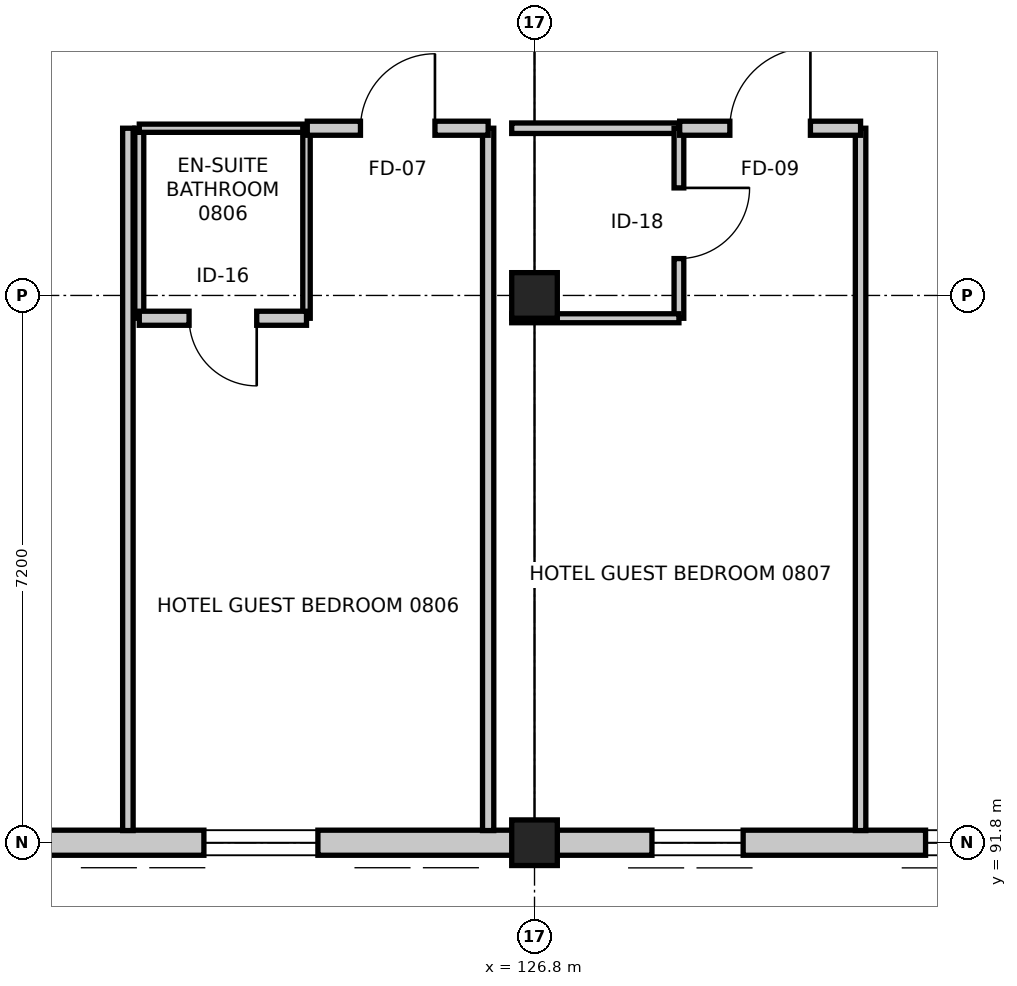
"""IFC4 building model, lengths in metres.
Left out: names, types, materials, properties, quantities, classifications, styles, units other than length and angle.
Written with IfcOpenShell. Run it as: python <this file> out.ifc"""

import sys

from ifc_helpers import new_model, si_unit, direction, frame, frame_2d, origin, origin_2d, place, context, subcontext, project, spatial, rectangle, extrude, element, fill, save


model = new_model("IFC4")
c1 = context("Model", 3, precision=1e-05, world=origin(), true_north=direction((0.0, 1.0)))
c2 = subcontext(c1, "Body", "Model", "MODEL_VIEW")
j1 = project(units=[si_unit("LENGTHUNIT", "METRE"), si_unit("PLANEANGLEUNIT", "RADIAN")], contexts=[c1])
p1 = place(None, origin())
s1 = spatial("IfcSite", under=j1, at=p1, CompositionType="ELEMENT")
p2 = place(p1, origin())
s2 = spatial("IfcBuilding", under=s1, at=p2, CompositionType="ELEMENT")
p3 = place(p2, frame((0.0, 0.0, 33.6)))
s3 = spatial("IfcBuildingStorey", under=s2, at=p3, CompositionType="ELEMENT", Elevation=33.6)
for number, where, z_axis, x_axis in (
    (1, (126.8, 91.8, 0.0), (0.0, 0.0, 1.0), (1.0, 0.0, 0.0)),
    (2, (126.8, 99.0, 0.0), (0.0, 0.0, 1.0), (1.0, 0.0, 0.0)),
):
    element("IfcColumn", number, at=place(p3, frame(where, z_axis=z_axis, x_axis=x_axis)), inside=s3, PredefinedType="COLUMN", context=c2, shape_type="SweptSolid", body=[
        extrude(rectangle(XDim=0.6, YDim=0.6, at=origin_2d()), origin(), (0.0, 0.0, 1.0), 3.6),
    ])
p4 = place(p3, frame((134.0, 91.8, 0.0), z_axis=(0.0, 0.0, 1.0), x_axis=(-1.0, 0.0, 0.0)))
e3 = element("IfcWall", 3, at=p4, inside=s3, PredefinedType="STANDARD", context=c2, shape_type="SweptSolid", body=[
    extrude(rectangle(XDim=7.2, YDim=0.33, at=frame_2d((3.6, 0.0))), origin(), (0.0, 0.0, 1.0), 2.745),
])
p5 = place(p4, frame((0.855, 0.0, 0.75)))
e4 = element("IfcOpeningElement", 4, at=p5, cuts=e3, PredefinedType="OPENING", context=c2, shape_type="SweptSolid", body=[
    extrude(rectangle(XDim=1.2, YDim=1.5, at=frame_2d((0.6, 0.75))), frame((0.0, 0.175, 0.0), z_axis=(0.0, -1.0, 0.0), x_axis=(1.0, 0.0, 0.0)), (0.0, 0.0, 1.0), 0.35),
])
p6 = place(p4, frame((4.455, 0.0, 0.75)))
e5 = element("IfcOpeningElement", 5, at=p6, cuts=e3, PredefinedType="OPENING", context=c2, shape_type="SweptSolid", body=[
    extrude(rectangle(XDim=1.2, YDim=1.5, at=frame_2d((0.6, 0.75))), frame((0.0, 0.175, 0.0), z_axis=(0.0, -1.0, 0.0), x_axis=(1.0, 0.0, 0.0)), (0.0, 0.0, 1.0), 0.35),
])
p7 = place(p3, frame((126.8, 91.8, 0.0), z_axis=(0.0, 0.0, 1.0), x_axis=(-1.0, 0.0, 0.0)))
e6 = element("IfcWall", 6, at=p7, inside=s3, PredefinedType="STANDARD", context=c2, shape_type="SweptSolid", body=[
    extrude(rectangle(XDim=7.2, YDim=0.33, at=frame_2d((3.6, 0.0))), origin(), (0.0, 0.0, 1.0), 2.745),
])
p8 = place(p7, frame((2.85, 0.0, 0.75)))
e7 = element("IfcOpeningElement", 7, at=p8, cuts=e6, PredefinedType="OPENING", context=c2, shape_type="SweptSolid", body=[
    extrude(rectangle(XDim=1.5, YDim=1.5, at=frame_2d((0.75, 0.75))), frame((0.0, 0.175, 0.0), z_axis=(0.0, -1.0, 0.0), x_axis=(1.0, 0.0, 0.0)), (0.0, 0.0, 1.0), 0.35),
])
p9 = place(p3, frame((121.6, 98.7, 0.0), z_axis=(0.0, 0.0, 1.0), x_axis=(0.0, 1.0, 0.0)))
e8 = element("IfcWall", 8, at=p9, inside=s3, PredefinedType="PARTITIONING", context=c2, shape_type="SweptSolid", body=[
    extrude(rectangle(XDim=2.5, YDim=0.118, at=frame_2d((1.25, 0.0))), origin(), (0.0, 0.0, 1.0), 2.745),
])
p10 = place(p3, frame((121.6, 101.2, 0.0), z_axis=(0.0, 0.0, 1.0), x_axis=(1.0, 0.0, 0.0)))
e9 = element("IfcWall", 9, at=p10, inside=s3, PredefinedType="PARTITIONING", context=c2, shape_type="SweptSolid", body=[
    extrude(rectangle(XDim=2.2, YDim=0.108, at=frame_2d((1.1, 0.0))), origin(), (0.0, 0.0, 1.0), 3.36),
])
p11 = place(p3, frame((123.8, 101.2, 0.0), z_axis=(0.0, 0.0, 1.0), x_axis=(0.0, -1.0, 0.0)))
e10 = element("IfcWall", 10, at=p11, inside=s3, PredefinedType="PARTITIONING", context=c2, shape_type="SweptSolid", body=[
    extrude(rectangle(XDim=2.5, YDim=0.098, at=frame_2d((1.25, 0.0))), origin(), (0.0, 0.0, 1.0), 2.745),
])
p12 = place(p3, frame((123.8, 98.7, 0.0), z_axis=(0.0, 0.0, 1.0), x_axis=(-1.0, 0.0, 0.0)))
e11 = element("IfcWall", 11, at=p12, inside=s3, PredefinedType="PARTITIONING", context=c2, shape_type="SweptSolid", body=[
    extrude(rectangle(XDim=2.2, YDim=0.185, at=frame_2d((1.1, 0.0))), origin(), (0.0, 0.0, 1.0), 2.745),
])
p13 = place(p12, frame((0.655, 0.0, 0.0)))
e12 = element("IfcOpeningElement", 12, at=p13, cuts=e11, PredefinedType="OPENING", context=c2, shape_type="SweptSolid", body=[
    extrude(rectangle(XDim=0.89, YDim=2.09, at=frame_2d((0.445, 1.045))), frame((0.0, 0.103, 0.0), z_axis=(0.0, -1.0, 0.0), x_axis=(1.0, 0.0, 0.0)), (0.0, 0.0, 1.0), 0.205),
])
p14 = place(p3, frame((126.19, 101.2, 0.0), z_axis=(0.0, 0.0, 1.0), x_axis=(0.0, -1.0, 0.0)))
e13 = element("IfcWall", 13, at=p14, inside=s3, PredefinedType="PARTITIONING", context=c2, shape_type="SweptSolid", body=[
    extrude(rectangle(XDim=9.24, YDim=0.148, at=frame_2d((4.62, 0.0))), origin(), (0.0, 0.0, 1.0), 2.745),
])
p15 = place(p3, frame((121.45, 91.96, 0.0), z_axis=(0.0, 0.0, 1.0), x_axis=(0.0, 1.0, 0.0)))
e14 = element("IfcWall", 14, at=p15, inside=s3, PredefinedType="PARTITIONING", context=c2, shape_type="SweptSolid", body=[
    extrude(rectangle(XDim=9.24, YDim=0.138, at=frame_2d((4.62, 0.0))), origin(), (0.0, 0.0, 1.0), 2.745),
])
p16 = place(p3, frame((123.81, 101.2, 0.0), z_axis=(0.0, 0.0, 1.0), x_axis=(1.0, 0.0, 0.0)))
e15 = element("IfcWall", 15, at=p16, inside=s3, PredefinedType="PARTITIONING", context=c2, shape_type="SweptSolid", body=[
    extrude(rectangle(XDim=2.38, YDim=0.185, at=frame_2d((1.19, 0.0))), origin(), (0.0, 0.0, 1.0), 3.36),
])
p17 = place(p16, frame((0.7, 0.0, 0.0)))
e16 = element("IfcOpeningElement", 16, at=p17, cuts=e15, PredefinedType="OPENING", context=c2, shape_type="SweptSolid", body=[
    extrude(rectangle(XDim=0.98, YDim=2.15, at=frame_2d((0.49, 1.075))), frame((0.0, 0.103, 0.0), z_axis=(0.0, -1.0, 0.0), x_axis=(1.0, 0.0, 0.0)), (0.0, 0.0, 1.0), 0.205),
])
p18 = place(p3, frame((126.5, 101.2, 0.0), z_axis=(0.0, 0.0, 1.0), x_axis=(1.0, 0.0, 0.0)))
e17 = element("IfcWall", 17, at=p18, inside=s3, PredefinedType="PARTITIONING", context=c2, shape_type="SweptSolid", body=[
    extrude(rectangle(XDim=2.2, YDim=0.138, at=frame_2d((1.1, 0.0))), origin(), (0.0, 0.0, 1.0), 2.695),
])
p19 = place(p3, frame((128.7, 101.2, 0.0), z_axis=(0.0, 0.0, 1.0), x_axis=(0.0, -1.0, 0.0)))
e18 = element("IfcWall", 18, at=p19, inside=s3, PredefinedType="PARTITIONING", context=c2, shape_type="SweptSolid", body=[
    extrude(rectangle(XDim=2.5, YDim=0.128, at=frame_2d((1.25, 0.0))), origin(), (0.0, 0.0, 1.0), 2.745),
])
p20 = place(p19, frame((0.785, 0.0, 0.0)))
e19 = element("IfcOpeningElement", 19, at=p20, cuts=e18, PredefinedType="OPENING", context=c2, shape_type="SweptSolid", body=[
    extrude(rectangle(XDim=0.93, YDim=2.13, at=frame_2d((0.465, 1.065))), frame((0.0, 0.074, 0.0), z_axis=(0.0, -1.0, 0.0), x_axis=(1.0, 0.0, 0.0)), (0.0, 0.0, 1.0), 0.148),
])
p21 = place(p3, frame((128.7, 98.7, 0.0), z_axis=(0.0, 0.0, 1.0), x_axis=(-1.0, 0.0, 0.0)))
e20 = element("IfcWall", 20, at=p21, inside=s3, PredefinedType="PARTITIONING", context=c2, shape_type="SweptSolid", body=[
    extrude(rectangle(XDim=2.2, YDim=0.118, at=frame_2d((1.1, 0.0))), origin(), (0.0, 0.0, 1.0), 2.695),
])
p22 = place(p3, frame((131.09, 101.2, 0.0), z_axis=(0.0, 0.0, 1.0), x_axis=(0.0, -1.0, 0.0)))
e21 = element("IfcWall", 21, at=p22, inside=s3, PredefinedType="PARTITIONING", context=c2, shape_type="SweptSolid", body=[
    extrude(rectangle(XDim=9.24, YDim=0.138, at=frame_2d((4.62, 0.0))), origin(), (0.0, 0.0, 1.0), 2.745),
])
p23 = place(p3, frame((128.71, 101.2, 0.0), z_axis=(0.0, 0.0, 1.0), x_axis=(1.0, 0.0, 0.0)))
e22 = element("IfcWall", 22, at=p23, inside=s3, PredefinedType="PARTITIONING", context=c2, shape_type="SweptSolid", body=[
    extrude(rectangle(XDim=2.38, YDim=0.185, at=frame_2d((1.19, 0.0))), origin(), (0.0, 0.0, 1.0), 3.36),
])
p24 = place(p23, frame((0.66, 0.0, 0.0)))
e23 = element("IfcOpeningElement", 23, at=p24, cuts=e22, PredefinedType="OPENING", context=c2, shape_type="SweptSolid", body=[
    extrude(rectangle(XDim=1.06, YDim=2.2, at=frame_2d((0.53, 1.1))), frame((0.0, 0.103, 0.0), z_axis=(0.0, -1.0, 0.0), x_axis=(1.0, 0.0, 0.0)), (0.0, 0.0, 1.0), 0.205),
])
p25 = place(p5, origin())
e24 = element("IfcWindow", 24, at=p25, inside=s3, PartitioningType="SINGLE_PANEL", PredefinedType="WINDOW", context=c2, shape_type="SweptSolid", body=[
    extrude(rectangle(XDim=1.2, YDim=1.5, at=frame_2d((0.6, 0.75))), frame((0.0, 0.03, 0.0), z_axis=(0.0, -1.0, 0.0), x_axis=(1.0, 0.0, 0.0)), (0.0, 0.0, 1.0), 0.06),
])
fill(e4, e24)
p26 = place(p8, origin())
e25 = element("IfcWindow", 25, at=p26, inside=s3, PartitioningType="SINGLE_PANEL", PredefinedType="WINDOW", context=c2, shape_type="SweptSolid", body=[
    extrude(rectangle(XDim=1.5, YDim=1.5, at=frame_2d((0.75, 0.75))), frame((0.0, 0.03, 0.0), z_axis=(0.0, -1.0, 0.0), x_axis=(1.0, 0.0, 0.0)), (0.0, 0.0, 1.0), 0.06),
])
fill(e7, e25)
p27 = place(p13, origin())
e26 = element("IfcDoor", 26, at=p27, inside=s3, OperationType="SINGLE_SWING_LEFT", PredefinedType="DOOR", context=c2, shape_type="SweptSolid", body=[
    extrude(rectangle(XDim=0.89, YDim=2.09, at=frame_2d((0.445, 1.045))), frame((0.0, 0.025, 0.0), z_axis=(0.0, -1.0, 0.0), x_axis=(1.0, 0.0, 0.0)), (0.0, 0.0, 1.0), 0.05),
])
fill(e12, e26)
p28 = place(p17, origin())
e27 = element("IfcDoor", 27, at=p28, inside=s3, OperationType="SINGLE_SWING_RIGHT", PredefinedType="DOOR", context=c2, shape_type="SweptSolid", body=[
    extrude(rectangle(XDim=0.98, YDim=2.15, at=frame_2d((0.49, 1.075))), frame((0.0, 0.025, 0.0), z_axis=(0.0, -1.0, 0.0), x_axis=(1.0, 0.0, 0.0)), (0.0, 0.0, 1.0), 0.05),
])
fill(e16, e27)
p29 = place(p20, origin())
e28 = element("IfcDoor", 28, at=p29, inside=s3, OperationType="SINGLE_SWING_LEFT", PredefinedType="DOOR", context=c2, shape_type="SweptSolid", body=[
    extrude(rectangle(XDim=0.93, YDim=2.13, at=frame_2d((0.465, 1.065))), frame((0.0, 0.025, 0.0), z_axis=(0.0, -1.0, 0.0), x_axis=(1.0, 0.0, 0.0)), (0.0, 0.0, 1.0), 0.05),
])
fill(e19, e28)
p30 = place(p24, origin())
e29 = element("IfcDoor", 29, at=p30, inside=s3, OperationType="SINGLE_SWING_RIGHT", PredefinedType="DOOR", context=c2, shape_type="SweptSolid", body=[
    extrude(rectangle(XDim=1.06, YDim=2.2, at=frame_2d((0.53, 1.1))), frame((0.0, 0.025, 0.0), z_axis=(0.0, -1.0, 0.0), x_axis=(1.0, 0.0, 0.0)), (0.0, 0.0, 1.0), 0.05),
])
fill(e23, e29)
p31 = place(p6, origin())
e30 = element("IfcWindow", 30, at=p31, inside=s3, PartitioningType="SINGLE_PANEL", PredefinedType="WINDOW", context=c2, shape_type="SweptSolid", body=[
    extrude(rectangle(XDim=1.2, YDim=1.5, at=frame_2d((0.6, 0.75))), frame((0.0, 0.03, 0.0), z_axis=(0.0, -1.0, 0.0), x_axis=(1.0, 0.0, 0.0)), (0.0, 0.0, 1.0), 0.06),
])
fill(e5, e30)
save(model, sys.argv[1])
